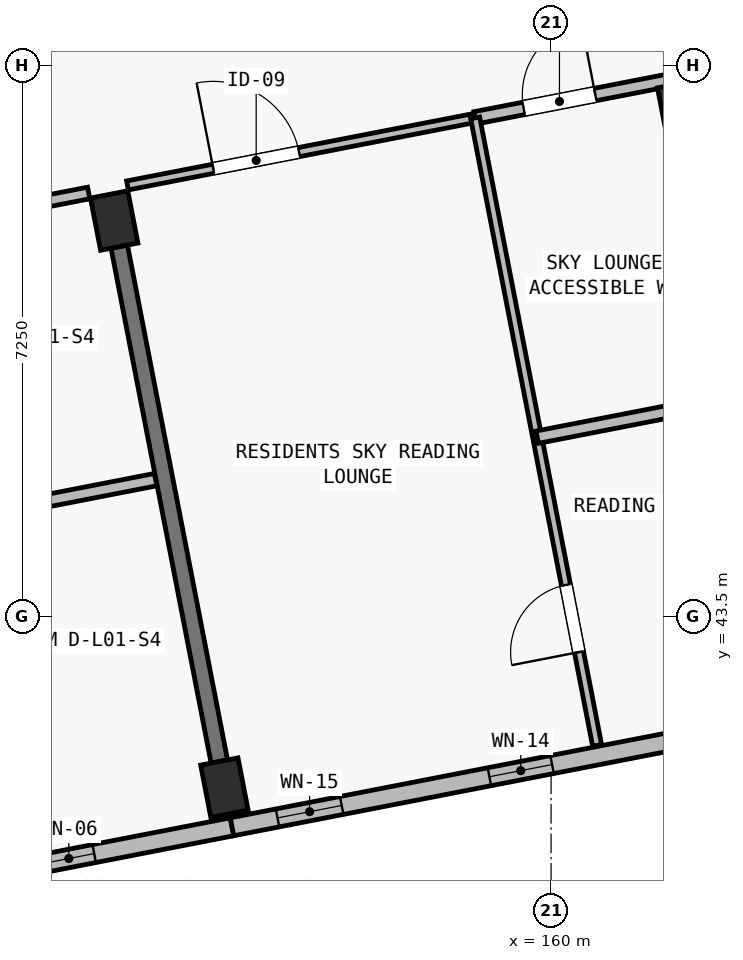
"""IFC4 building model, lengths in metres.
Left out: names, types, materials, properties, quantities, classifications, styles, units other than length and angle.
Written with IfcOpenShell. Run it as: python <this file> out.ifc"""

import sys

from ifc_helpers import new_model, si_unit, direction, frame, frame_2d, origin, origin_2d, place, context, subcontext, project, spatial, rectangle, extrude, element, fill, save


model = new_model("IFC4")
c1 = context("Model", 3, precision=1e-05, world=origin(), true_north=direction((0.0, 1.0)))
c2 = subcontext(c1, "Body", "Model", "MODEL_VIEW")
j1 = project(units=[si_unit("LENGTHUNIT", "METRE"), si_unit("PLANEANGLEUNIT", "RADIAN")], contexts=[c1])
p1 = place(None, origin())
s1 = spatial("IfcSite", under=j1, at=p1, CompositionType="ELEMENT")
p2 = place(p1, origin())
s2 = spatial("IfcBuilding", under=s1, at=p2, CompositionType="ELEMENT")
p3 = place(p2, frame((0.0, 0.0, 4.5)))
s3 = spatial("IfcBuildingStorey", under=s2, at=p3, CompositionType="ELEMENT", Elevation=4.5)
for number, where, z_axis, x_axis in (
    (1, (155.702, 41.251, 0.0), (0.0, 0.0, 1.0), (0.982, 0.191, 0.0)),
    (2, (154.252, 48.711, 0.0), (0.0, 0.0, 1.0), (0.982, 0.191, 0.0)),
    (3, (161.712, 50.161, 0.0), (0.0, 0.0, 1.0), (0.982, 0.191, 0.0)),
):
    element("IfcColumn", number, at=place(p3, frame(where, z_axis=z_axis, x_axis=x_axis)), inside=s3, PredefinedType="COLUMN", context=c2, shape_type="SweptSolid", body=[
        extrude(rectangle(XDim=0.5, YDim=0.7, at=origin_2d()), origin(), (0.0, 0.0, 1.0), 3.9),
    ])
p4 = place(p3, frame((155.635, 41.594, -0.25), z_axis=(0.0, 0.0, 1.0), x_axis=(-0.190819465253, 0.981625148252, 0.0)))
e4 = element("IfcWall", 4, at=p4, inside=s3, PredefinedType="SHEAR", context=c2, shape_type="SweptSolid", body=[
    extrude(rectangle(XDim=6.9, YDim=0.22, at=frame_2d((3.45, 0.0))), origin(), (0.0, 0.0, 1.0), 3.4),
])
p5 = place(p3, frame((155.802, 40.735, 0.0), z_axis=(0.0, 0.0, 1.0), x_axis=(-0.981626422232, -0.190812911449, 0.0)))
e5 = element("IfcWall", 5, at=p5, inside=s3, PredefinedType="SOLIDWALL", context=c2, shape_type="SweptSolid", body=[
    extrude(rectangle(XDim=7.6, YDim=0.24, at=frame_2d((3.8, 0.0))), origin(), (0.0, 0.0, 1.0), 3.65),
])
p6 = place(p5, frame((1.847, 0.0, 0.52)))
e6 = element("IfcOpeningElement", 6, at=p6, cuts=e5, PredefinedType="OPENING", context=c2, shape_type="SweptSolid", body=[
    extrude(rectangle(XDim=0.68, YDim=2.24, at=frame_2d((0.34, 1.12))), frame((0.0, 0.135, 0.0), z_axis=(0.0, -1.0, 0.0), x_axis=(1.0, 0.0, 0.0)), (0.0, 0.0, 1.0), 0.27),
])
p7 = place(p5, frame((5.062, 0.0, 0.52)))
e7 = element("IfcOpeningElement", 7, at=p7, cuts=e5, PredefinedType="OPENING", context=c2, shape_type="SweptSolid", body=[
    extrude(rectangle(XDim=0.74, YDim=2.26, at=frame_2d((0.37, 1.13))), frame((0.0, 0.135, 0.0), z_axis=(0.0, -1.0, 0.0), x_axis=(1.0, 0.0, 0.0)), (0.0, 0.0, 1.0), 0.27),
])
p8 = place(p3, frame((163.778, 42.286, 0.0), z_axis=(0.0, 0.0, 1.0), x_axis=(-0.981628367112, -0.190802905848, 0.0)))
e8 = element("IfcWall", 8, at=p8, inside=s3, PredefinedType="SOLIDWALL", context=c2, shape_type="SweptSolid", body=[
    extrude(rectangle(XDim=8.125, YDim=0.24, at=frame_2d((4.062, 0.0))), origin(), (0.0, 0.0, 1.0), 3.65),
])
p9 = place(p8, frame((1.223, 0.0, 0.42)))
e9 = element("IfcOpeningElement", 9, at=p9, cuts=e8, PredefinedType="OPENING", context=c2, shape_type="SweptSolid", body=[
    extrude(rectangle(XDim=0.78, YDim=2.2, at=frame_2d((0.39, 1.1))), frame((0.0, 0.135, 0.0), z_axis=(0.0, -1.0, 0.0), x_axis=(1.0, 0.0, 0.0)), (0.0, 0.0, 1.0), 0.27),
])
p10 = place(p8, frame((3.835, 0.0, 0.42)))
e10 = element("IfcOpeningElement", 10, at=p10, cuts=e8, PredefinedType="OPENING", context=c2, shape_type="SweptSolid", body=[
    extrude(rectangle(XDim=0.84, YDim=2.28, at=frame_2d((0.42, 1.14))), frame((0.0, 0.135, 0.0), z_axis=(0.0, -1.0, 0.0), x_axis=(1.0, 0.0, 0.0)), (0.0, 0.0, 1.0), 0.27),
])
p11 = place(p8, frame((6.655, 0.0, 0.48)))
e11 = element("IfcOpeningElement", 11, at=p11, cuts=e8, PredefinedType="OPENING", context=c2, shape_type="SweptSolid", body=[
    extrude(rectangle(XDim=0.86, YDim=2.36, at=frame_2d((0.43, 1.18))), frame((0.0, 0.135, 0.0), z_axis=(0.0, -1.0, 0.0), x_axis=(1.0, 0.0, 0.0)), (0.0, 0.0, 1.0), 0.27),
])
p12 = place(p3, frame((159.837, 62.556, 0.0), z_axis=(0.0, 0.0, 1.0), x_axis=(0.389225507936, -0.921142499276, 0.0)))
e12 = element("IfcWall", 12, at=p12, inside=s3, PredefinedType="SOLIDWALL", context=c2, shape_type="SweptSolid", body=[
    extrude(rectangle(XDim=17.91, YDim=0.26, at=frame_2d((8.955, 0.0))), origin(), (0.0, 0.0, 1.0), 3.65),
])
p13 = place(p12, frame((2.63, 0.0, 0.52)))
e13 = element("IfcOpeningElement", 13, at=p13, cuts=e12, PredefinedType="OPENING", context=c2, shape_type="SweptSolid", body=[
    extrude(rectangle(XDim=0.6, YDim=2.22, at=frame_2d((0.3, 1.11))), frame((0.0, 0.145, 0.0), z_axis=(0.0, -1.0, 0.0), x_axis=(1.0, 0.0, 0.0)), (0.0, 0.0, 1.0), 0.29),
])
p14 = place(p12, frame((14.18, 0.0, 0.45)))
e14 = element("IfcOpeningElement", 14, at=p14, cuts=e12, PredefinedType="OPENING", context=c2, shape_type="SweptSolid", body=[
    extrude(rectangle(XDim=0.74, YDim=2.26, at=frame_2d((0.37, 1.13))), frame((0.0, 0.145, 0.0), z_axis=(0.0, -1.0, 0.0), x_axis=(1.0, 0.0, 0.0)), (0.0, 0.0, 1.0), 0.29),
])
p15 = place(p3, frame((161.643, 50.515, 0.0), z_axis=(0.0, 0.0, 1.0), x_axis=(-0.190805731561, 0.981627817864, 0.0)))
e15 = element("IfcWall", 15, at=p15, inside=s3, PredefinedType="PARTITIONING", context=c2, shape_type="SweptSolid", body=[
    extrude(rectangle(XDim=3.68, YDim=0.12, at=frame_2d((1.84, 0.0))), origin(), (0.0, 0.0, 1.0), 3.15),
])
p16 = place(p15, frame((1.35, 0.0, 0.0)))
e16 = element("IfcOpeningElement", 16, at=p16, cuts=e15, PredefinedType="OPENING", context=c2, shape_type="SweptSolid", body=[
    extrude(rectangle(XDim=0.9, YDim=2.1, at=frame_2d((0.45, 1.05))), frame((0.0, 0.075, 0.0), z_axis=(0.0, -1.0, 0.0), x_axis=(1.0, 0.0, 0.0)), (0.0, 0.0, 1.0), 0.15),
])
p17 = place(p3, frame((146.966, 47.723, 0.0), z_axis=(0.0, 0.0, 1.0), x_axis=(0.981629923556, 0.190794898199, 0.0)))
e17 = element("IfcWall", 17, at=p17, inside=s3, PredefinedType="PARTITIONING", context=c2, shape_type="SweptSolid", body=[
    extrude(rectangle(XDim=7.08, YDim=0.155, at=frame_2d((3.54, 0.0))), origin(), (0.0, 0.0, 1.0), 3.62),
])
p18 = place(p17, frame((1.33, 0.0, 0.0)))
e18 = element("IfcOpeningElement", 18, at=p18, cuts=e17, PredefinedType="OPENING", context=c2, shape_type="SweptSolid", body=[
    extrude(rectangle(XDim=0.98, YDim=2.15, at=frame_2d((0.49, 1.075))), frame((0.0, 0.093, 0.0), z_axis=(0.0, -1.0, 0.0), x_axis=(1.0, 0.0, 0.0)), (0.0, 0.0, 1.0), 0.185),
])
p19 = place(p3, frame((151.18, 44.599, 0.0), z_axis=(0.0, 0.0, 1.0), x_axis=(0.981628834294, 0.190800502313, 0.0)))
e19 = element("IfcWall", 19, at=p19, inside=s3, PredefinedType="PLUMBINGWALL", context=c2, shape_type="SweptSolid", body=[
    extrude(rectangle(XDim=3.685, YDim=0.165, at=frame_2d((1.843, 0.0))), origin(), (0.0, 0.0, 1.0), 3.62),
])
p20 = place(p19, frame((1.3, 0.0, 0.0)))
e20 = element("IfcOpeningElement", 20, at=p20, cuts=e19, PredefinedType="OPENING", context=c2, shape_type="SweptSolid", body=[
    extrude(rectangle(XDim=0.82, YDim=2.08, at=frame_2d((0.41, 1.04))), frame((0.0, 0.097, 0.0), z_axis=(0.0, -1.0, 0.0), x_axis=(1.0, 0.0, 0.0)), (0.0, 0.0, 1.0), 0.195),
])
p21 = place(p3, frame((154.427, 49.173, 0.0), z_axis=(0.0, 0.0, 1.0), x_axis=(0.981628202514, 0.190803752658, 0.0)))
e21 = element("IfcWall", 21, at=p21, inside=s3, PredefinedType="PARTITIONING", context=c2, shape_type="SweptSolid", body=[
    extrude(rectangle(XDim=4.66, YDim=0.12, at=frame_2d((2.33, 0.0))), origin(), (0.0, 0.0, 1.0), 3.62),
])
p22 = place(p21, frame((1.15, 0.0, 0.0)))
e22 = element("IfcOpeningElement", 22, at=p22, cuts=e21, PredefinedType="OPENING", context=c2, shape_type="SweptSolid", body=[
    extrude(rectangle(XDim=1.15, YDim=2.15, at=frame_2d((0.575, 1.075))), frame((0.0, 0.075, 0.0), z_axis=(0.0, -1.0, 0.0), x_axis=(1.0, 0.0, 0.0)), (0.0, 0.0, 1.0), 0.15),
])
p23 = place(p3, frame((159.001, 50.062, 0.0), z_axis=(0.0, 0.0, 1.0), x_axis=(0.981624151626, 0.190824592083, 0.0)))
e23 = element("IfcWall", 23, at=p23, inside=s3, PredefinedType="PLUMBINGWALL", context=c2, shape_type="SweptSolid", body=[
    extrude(rectangle(XDim=2.61, YDim=0.165, at=frame_2d((1.305, 0.0))), origin(), (0.0, 0.0, 1.0), 3.62),
])
p24 = place(p23, frame((0.65, 0.0, 0.0)))
e24 = element("IfcOpeningElement", 24, at=p24, cuts=e23, PredefinedType="OPENING", context=c2, shape_type="SweptSolid", body=[
    extrude(rectangle(XDim=0.96, YDim=2.12, at=frame_2d((0.48, 1.06))), frame((0.0, 0.097, 0.0), z_axis=(0.0, -1.0, 0.0), x_axis=(1.0, 0.0, 0.0)), (0.0, 0.0, 1.0), 0.195),
])
p25 = place(p3, frame((160.606, 41.807, 0.0), z_axis=(0.0, 0.0, 1.0), x_axis=(-0.190809830256, 0.981627021163, 0.0)))
e25 = element("IfcWall", 25, at=p25, inside=s3, PredefinedType="PARTITIONING", context=c2, shape_type="SweptSolid", body=[
    extrude(rectangle(XDim=8.41, YDim=0.12, at=frame_2d((4.205, 0.0))), origin(), (0.0, 0.0, 1.0), 3.62),
])
p26 = place(p25, frame((1.25, 0.0, 0.0)))
e26 = element("IfcOpeningElement", 26, at=p26, cuts=e25, PredefinedType="OPENING", context=c2, shape_type="SweptSolid", body=[
    extrude(rectangle(XDim=0.9, YDim=2.1, at=frame_2d((0.45, 1.05))), frame((0.0, 0.075, 0.0), z_axis=(0.0, -1.0, 0.0), x_axis=(1.0, 0.0, 0.0)), (0.0, 0.0, 1.0), 0.15),
])
p27 = place(p3, frame((159.818, 45.861, 0.0), z_axis=(0.0, 0.0, 1.0), x_axis=(0.981628634101, 0.19080153226, 0.0)))
e27 = element("IfcWall", 27, at=p27, inside=s3, PredefinedType="PLUMBINGWALL", context=c2, shape_type="SweptSolid", body=[
    extrude(rectangle(XDim=2.59, YDim=0.165, at=frame_2d((1.295, 0.0))), origin(), (0.0, 0.0, 1.0), 3.62),
])
p28 = place(p6, origin())
e28 = element("IfcWindow", 28, at=p28, inside=s3, PartitioningType="SINGLE_PANEL", PredefinedType="WINDOW", context=c2, shape_type="SweptSolid", body=[
    extrude(rectangle(XDim=0.68, YDim=2.24, at=frame_2d((0.34, 1.12))), frame((0.0, 0.03, 0.0), z_axis=(0.0, -1.0, 0.0), x_axis=(1.0, 0.0, 0.0)), (0.0, 0.0, 1.0), 0.06),
])
fill(e6, e28)
p29 = place(p10, origin())
e29 = element("IfcWindow", 29, at=p29, inside=s3, PartitioningType="SINGLE_PANEL", PredefinedType="WINDOW", context=c2, shape_type="SweptSolid", body=[
    extrude(rectangle(XDim=0.84, YDim=2.28, at=frame_2d((0.42, 1.14))), frame((0.0, 0.03, 0.0), z_axis=(0.0, -1.0, 0.0), x_axis=(1.0, 0.0, 0.0)), (0.0, 0.0, 1.0), 0.06),
])
fill(e10, e29)
p30 = place(p11, origin())
e30 = element("IfcWindow", 30, at=p30, inside=s3, PartitioningType="SINGLE_PANEL", PredefinedType="WINDOW", context=c2, shape_type="SweptSolid", body=[
    extrude(rectangle(XDim=0.86, YDim=2.36, at=frame_2d((0.43, 1.18))), frame((0.0, 0.03, 0.0), z_axis=(0.0, -1.0, 0.0), x_axis=(1.0, 0.0, 0.0)), (0.0, 0.0, 1.0), 0.06),
])
fill(e11, e30)
p31 = place(p22, origin())
e31 = element("IfcDoor", 31, at=p31, inside=s3, OperationType="SINGLE_SWING_LEFT", PredefinedType="DOOR", context=c2, shape_type="SweptSolid", body=[
    extrude(rectangle(XDim=1.15, YDim=2.15, at=frame_2d((0.575, 1.075))), frame((0.0, 0.025, 0.0), z_axis=(0.0, -1.0, 0.0), x_axis=(1.0, 0.0, 0.0)), (0.0, 0.0, 1.0), 0.05),
])
fill(e22, e31)
p32 = place(p24, origin())
e32 = element("IfcDoor", 32, at=p32, inside=s3, OperationType="SINGLE_SWING_RIGHT", PredefinedType="DOOR", context=c2, shape_type="SweptSolid", body=[
    extrude(rectangle(XDim=0.96, YDim=2.12, at=frame_2d((0.48, 1.06))), frame((0.0, 0.025, 0.0), z_axis=(0.0, -1.0, 0.0), x_axis=(1.0, 0.0, 0.0)), (0.0, 0.0, 1.0), 0.05),
])
fill(e24, e32)
p33 = place(p26, origin())
e33 = element("IfcDoor", 33, at=p33, inside=s3, OperationType="SINGLE_SWING_LEFT", PredefinedType="DOOR", context=c2, shape_type="SweptSolid", body=[
    extrude(rectangle(XDim=0.9, YDim=2.1, at=frame_2d((0.45, 1.05))), frame((0.0, 0.025, 0.0), z_axis=(0.0, -1.0, 0.0), x_axis=(1.0, 0.0, 0.0)), (0.0, 0.0, 1.0), 0.05),
])
fill(e26, e33)
save(model, sys.argv[1])
